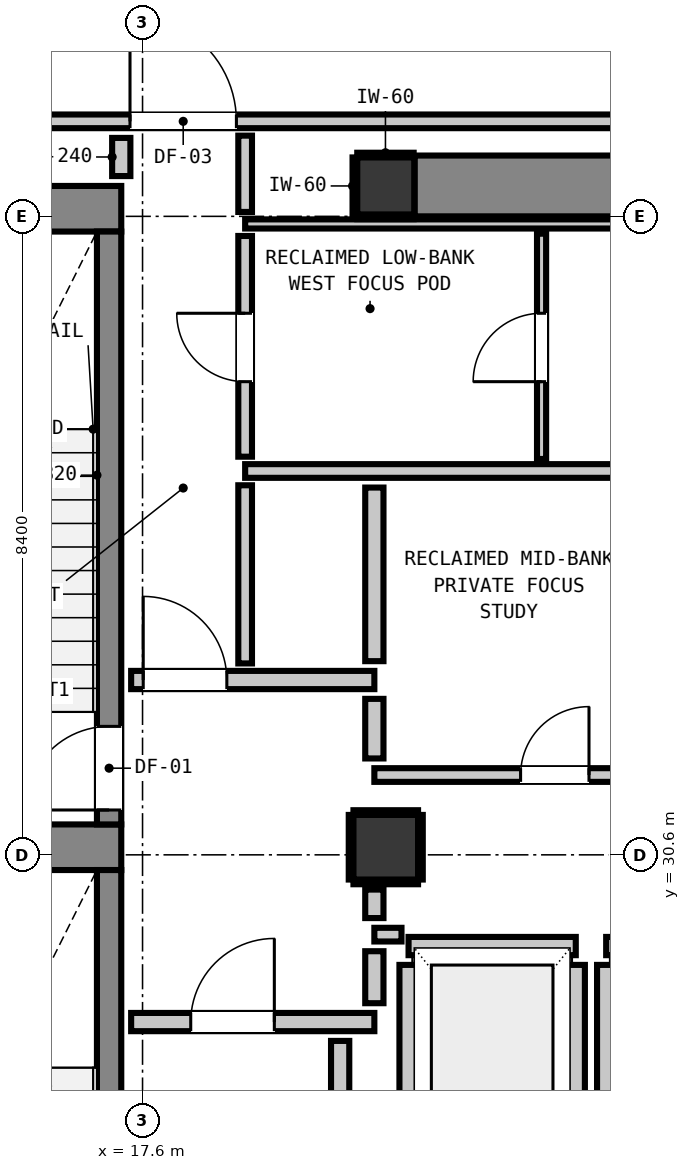
"""IFC4 building model, lengths in metres.
Left out: names, types, materials, properties, quantities, classifications, styles, units other than length and angle.
Written with IfcOpenShell. Run it as: python <this file> out.ifc"""

import sys

from ifc_helpers import new_model, si_unit, direction, frame, frame_2d, origin, origin_2d, place, context, subcontext, project, spatial, rectangle, extrude, element, fill, save


model = new_model("IFC4")
c1 = context("Model", 3, precision=1e-05, world=origin(), true_north=direction((0.0, 1.0)))
c2 = subcontext(c1, "Body", "Model", "MODEL_VIEW")
j1 = project(units=[si_unit("LENGTHUNIT", "METRE"), si_unit("PLANEANGLEUNIT", "RADIAN")], contexts=[c1])
p1 = place(None, origin())
s1 = spatial("IfcSite", under=j1, at=p1, CompositionType="ELEMENT")
p2 = place(p1, origin())
s2 = spatial("IfcBuilding", under=s1, at=p2, CompositionType="ELEMENT")
p3 = place(p2, frame((0.0, 0.0, 226.68)))
s3 = spatial("IfcBuildingStorey", under=s2, at=p3, CompositionType="ELEMENT", Elevation=226.68)
p4 = place(p3, frame((20.8, 39.4, 0.0), z_axis=(0.0, 0.0, 1.0), x_axis=(1.0, 0.0, 0.0)))
e1 = element("IfcColumn", 1, at=p4, inside=s3, PredefinedType="COLUMN", context=c2, shape_type="SweptSolid", body=[
    extrude(rectangle(XDim=0.75, YDim=0.75, at=origin_2d()), origin(), (0.0, 0.0, 1.0), 4.6),
])
p5 = place(p3, frame((13.24, 39.1, 0.0), z_axis=(0.0, 0.0, 1.0), x_axis=(1.0, 0.0, 0.0)))
e2 = element("IfcWall", 2, at=p5, inside=s3, PredefinedType="SHEAR", context=c2, shape_type="SweptSolid", body=[
    extrude(rectangle(XDim=4.08, YDim=0.6, at=frame_2d((2.04, 0.0))), origin(), (0.0, 0.0, 1.0), 4.6),
])
p6 = place(p3, frame((13.78, 30.7, 0.0), z_axis=(0.0, 0.0, 1.0), x_axis=(1.0, 0.0, 0.0)))
e3 = element("IfcWall", 3, at=p6, inside=s3, PredefinedType="SHEAR", context=c2, shape_type="SweptSolid", body=[
    extrude(rectangle(XDim=3.54, YDim=0.6, at=frame_2d((1.77, 0.0))), origin(), (0.0, 0.0, 1.0), 4.6),
])
p7 = place(p3, frame((21.18, 39.4, 0.0), z_axis=(0.0, 0.0, 1.0), x_axis=(1.0, 0.0, 0.0)))
e4 = element("IfcWall", 4, at=p7, inside=s3, PredefinedType="SHEAR", context=c2, shape_type="SweptSolid", body=[
    extrude(rectangle(XDim=7.64, YDim=0.8, at=frame_2d((3.82, 0.0))), origin(), (0.0, 0.0, 1.0), 4.6),
])
p8 = place(p3, frame((17.16, 31.0, 0.0), z_axis=(0.0, 0.0, 1.0), x_axis=(0.0, 1.0, 0.0)))
e5 = element("IfcWall", 5, at=p8, inside=s3, PredefinedType="SHEAR", context=c2, shape_type="SweptSolid", body=[
    extrude(rectangle(XDim=7.8, YDim=0.32, at=frame_2d((3.9, 0.0))), origin(), (0.0, 0.0, 1.0), 4.6),
])
p9 = place(p8, frame((0.19, 0.0, 0.0)))
e6 = element("IfcOpeningElement", 6, at=p9, cuts=e5, PredefinedType="OPENING", context=c2, shape_type="SweptSolid", body=[
    extrude(rectangle(XDim=1.1, YDim=2.15, at=frame_2d((0.55, 1.075))), frame((0.0, 0.17, 0.0), z_axis=(0.0, -1.0, 0.0), x_axis=(1.0, 0.0, 0.0)), (0.0, 0.0, 1.0), 0.34),
])
p10 = place(p3, frame((17.16, 22.4, 0.0), z_axis=(0.0, 0.0, 1.0), x_axis=(0.0, 1.0, 0.0)))
e7 = element("IfcWall", 7, at=p10, inside=s3, PredefinedType="SHEAR", context=c2, shape_type="SweptSolid", body=[
    extrude(rectangle(XDim=8.0, YDim=0.32, at=frame_2d((4.0, 0.0))), origin(), (0.0, 0.0, 1.0), 4.6),
])
p11 = place(p10, frame((0.39, 0.0, 0.0)))
e8 = element("IfcOpeningElement", 8, at=p11, cuts=e7, PredefinedType="OPENING", context=c2, shape_type="SweptSolid", body=[
    extrude(rectangle(XDim=1.1, YDim=2.15, at=frame_2d((0.55, 1.075))), frame((0.0, 0.17, 0.0), z_axis=(0.0, -1.0, 0.0), x_axis=(1.0, 0.0, 0.0)), (0.0, 0.0, 1.0), 0.34),
])
p12 = place(p3, frame((20.8, 30.7, 0.0), z_axis=(0.0, 0.0, 1.0), x_axis=(1.0, 0.0, 0.0)))
e9 = element("IfcColumn", 9, at=p12, inside=s3, PredefinedType="COLUMN", context=c2, shape_type="SweptSolid", body=[
    extrude(rectangle(XDim=0.85, YDim=0.85, at=origin_2d()), origin(), (0.0, 0.0, 1.0), 4.6),
])
p13 = place(p3, frame((21.1, 29.4, 0.0), z_axis=(0.0, 0.0, 1.0), x_axis=(1.0, 0.0, 0.0)))
e10 = element("IfcWall", 10, at=p13, inside=s3, PredefinedType="PARTITIONING", context=c2, shape_type="SweptSolid", body=[
    extrude(rectangle(XDim=2.2, YDim=0.24, at=frame_2d((1.1, 0.0))), origin(), (0.0, 0.0, 1.0), 4.18),
])
p14 = place(p3, frame((21.1, 27.048, 0.0), z_axis=(0.0, 0.0, 1.0), x_axis=(0.0, 1.0, 0.0)))
e11 = element("IfcWall", 11, at=p14, inside=s3, PredefinedType="PARTITIONING", context=c2, shape_type="SweptSolid", body=[
    extrude(rectangle(XDim=2.104, YDim=0.24, at=frame_2d((1.052, 0.0))), origin(), (0.0, 0.0, 1.0), 2.185),
])
p15 = place(p3, frame((23.3, 27.048, 0.0), z_axis=(0.0, 0.0, 1.0), x_axis=(0.0, 1.0, 0.0)))
e12 = element("IfcWall", 12, at=p15, inside=s3, PredefinedType="PARTITIONING", context=c2, shape_type="SweptSolid", body=[
    extrude(rectangle(XDim=2.104, YDim=0.24, at=frame_2d((1.052, 0.0))), origin(), (0.0, 0.0, 1.0), 4.18),
])
p16 = place(p3, frame((23.7, 29.4, 0.0), z_axis=(0.0, 0.0, 1.0), x_axis=(1.0, 0.0, 0.0)))
e13 = element("IfcWall", 13, at=p16, inside=s3, PredefinedType="PARTITIONING", context=c2, shape_type="SweptSolid", body=[
    extrude(rectangle(XDim=2.2, YDim=0.24, at=frame_2d((1.1, 0.0))), origin(), (0.0, 0.0, 1.0), 4.18),
])
p17 = place(p3, frame((23.7, 27.048, 0.0), z_axis=(0.0, 0.0, 1.0), x_axis=(0.0, 1.0, 0.0)))
e14 = element("IfcWall", 14, at=p17, inside=s3, PredefinedType="PARTITIONING", context=c2, shape_type="SweptSolid", body=[
    extrude(rectangle(XDim=2.104, YDim=0.24, at=frame_2d((1.052, 0.0))), origin(), (0.0, 0.0, 1.0), 4.18),
])
p18 = place(p3, frame((17.45, 28.4, 0.0), z_axis=(0.0, 0.0, 1.0), x_axis=(1.0, 0.0, 0.0)))
e15 = element("IfcWall", 15, at=p18, inside=s3, PredefinedType="PARTITIONING", context=c2, shape_type="SweptSolid", body=[
    extrude(rectangle(XDim=3.2, YDim=0.24, at=frame_2d((1.6, 0.0))), origin(), (0.0, 0.0, 1.0), 4.18),
])
p19 = place(p18, frame((0.784, 0.0, 0.0)))
e16 = element("IfcOpeningElement", 16, at=p19, cuts=e15, PredefinedType="OPENING", context=c2, shape_type="SweptSolid", body=[
    extrude(rectangle(XDim=1.1, YDim=2.15, at=frame_2d((0.55, 1.075))), frame((0.0, 0.13, 0.0), z_axis=(0.0, -1.0, 0.0), x_axis=(1.0, 0.0, 0.0)), (0.0, 0.0, 1.0), 0.26),
])
p20 = place(p3, frame((17.45, 32.9, 0.0), z_axis=(0.0, 0.0, 1.0), x_axis=(1.0, 0.0, 0.0)))
e17 = element("IfcWall", 17, at=p20, inside=s3, PredefinedType="PARTITIONING", context=c2, shape_type="SweptSolid", body=[
    extrude(rectangle(XDim=3.2, YDim=0.24, at=frame_2d((1.6, 0.0))), origin(), (0.0, 0.0, 1.0), 4.18),
])
p21 = place(p20, frame((0.159, 0.0, 0.0)))
e18 = element("IfcOpeningElement", 18, at=p21, cuts=e17, PredefinedType="OPENING", context=c2, shape_type="SweptSolid", body=[
    extrude(rectangle(XDim=1.1, YDim=2.15, at=frame_2d((0.55, 1.075))), frame((0.0, 0.13, 0.0), z_axis=(0.0, -1.0, 0.0), x_axis=(1.0, 0.0, 0.0)), (0.0, 0.0, 1.0), 0.26),
])
p22 = place(p3, frame((20.65, 29.55, 0.0), z_axis=(0.0, 0.0, 1.0), x_axis=(1.0, 0.0, 0.0)))
e19 = element("IfcWall", 19, at=p22, inside=s3, PredefinedType="PARTITIONING", context=c2, shape_type="SweptSolid", body=[
    extrude(rectangle(XDim=0.357, YDim=0.18, at=frame_2d((0.179, 0.0))), origin(), (0.0, 0.0, 1.0), 4.18),
])
p23 = place(p3, frame((20.65, 31.65, 0.0), z_axis=(0.0, 0.0, 1.0), x_axis=(1.0, 0.0, 0.0)))
e20 = element("IfcWall", 20, at=p23, inside=s3, PredefinedType="PARTITIONING", context=c2, shape_type="SweptSolid", body=[
    extrude(rectangle(XDim=7.7, YDim=0.18, at=frame_2d((3.85, 0.0))), origin(), (0.0, 0.0, 1.0), 4.18),
])
p24 = place(p23, frame((1.924, 0.0, 0.0)))
e21 = element("IfcOpeningElement", 21, at=p24, cuts=e20, PredefinedType="OPENING", context=c2, shape_type="SweptSolid", body=[
    extrude(rectangle(XDim=0.9, YDim=2.1, at=frame_2d((0.45, 1.05))), frame((0.0, 0.1, 0.0), z_axis=(0.0, -1.0, 0.0), x_axis=(1.0, 0.0, 0.0)), (0.0, 0.0, 1.0), 0.2),
])
p25 = place(p3, frame((18.95, 35.65, 0.0), z_axis=(0.0, 0.0, 1.0), x_axis=(1.0, 0.0, 0.0)))
e22 = element("IfcWall", 22, at=p25, inside=s3, PredefinedType="PARTITIONING", context=c2, shape_type="SweptSolid", body=[
    extrude(rectangle(XDim=11.025, YDim=0.18, at=frame_2d((5.513, 0.0))), origin(), (0.0, 0.0, 1.0), 4.18),
])
p26 = place(p3, frame((10.787, 40.25, 0.0), z_axis=(0.0, 0.0, 1.0), x_axis=(1.0, 0.0, 0.0)))
e23 = element("IfcWall", 23, at=p26, inside=s3, PredefinedType="PARTITIONING", context=c2, shape_type="SweptSolid", body=[
    extrude(rectangle(XDim=36.626, YDim=0.18, at=frame_2d((18.313, 0.0))), origin(), (0.0, 0.0, 1.0), 4.18),
])
p27 = place(p26, frame((6.648, 0.0, 0.0)))
e24 = element("IfcOpeningElement", 24, at=p27, cuts=e23, PredefinedType="OPENING", context=c2, shape_type="SweptSolid", body=[
    extrude(rectangle(XDim=1.4, YDim=2.15, at=frame_2d((0.7, 1.075))), frame((0.0, 0.1, 0.0), z_axis=(0.0, -1.0, 0.0), x_axis=(1.0, 0.0, 0.0)), (0.0, 0.0, 1.0), 0.2),
])
p28 = place(p26, frame((1.012, 0.0, 0.0)))
e25 = element("IfcOpeningElement", 25, at=p28, cuts=e23, PredefinedType="OPENING", context=c2, shape_type="SweptSolid", body=[
    extrude(rectangle(XDim=1.0, YDim=2.15, at=frame_2d((0.5, 1.075))), frame((0.0, 0.1, 0.0), z_axis=(0.0, -1.0, 0.0), x_axis=(1.0, 0.0, 0.0)), (0.0, 0.0, 1.0), 0.2),
])
p29 = place(p26, frame((27.263, 0.0, 0.0)))
e26 = element("IfcOpeningElement", 26, at=p29, cuts=e23, PredefinedType="OPENING", context=c2, shape_type="SweptSolid", body=[
    extrude(rectangle(XDim=1.4, YDim=2.15, at=frame_2d((0.7, 1.075))), frame((0.0, 0.1, 0.0), z_axis=(0.0, -1.0, 0.0), x_axis=(1.0, 0.0, 0.0)), (0.0, 0.0, 1.0), 0.2),
])
p30 = place(p26, frame((32.289, 0.0, 0.0)))
e27 = element("IfcOpeningElement", 27, at=p30, cuts=e23, PredefinedType="OPENING", context=c2, shape_type="SweptSolid", body=[
    extrude(rectangle(XDim=0.95, YDim=2.1, at=frame_2d((0.475, 1.05))), frame((0.0, 0.1, 0.0), z_axis=(0.0, -1.0, 0.0), x_axis=(1.0, 0.0, 0.0)), (0.0, 0.0, 1.0), 0.2),
])
p31 = place(p3, frame((18.95, 38.9, 0.0), z_axis=(0.0, 0.0, 1.0), x_axis=(1.0, 0.0, 0.0)))
e28 = element("IfcWall", 28, at=p31, inside=s3, PredefinedType="PARTITIONING", context=c2, shape_type="SweptSolid", body=[
    extrude(rectangle(XDim=11.025, YDim=0.12, at=frame_2d((5.513, 0.0))), origin(), (0.0, 0.0, 1.0), 2.185),
])
p32 = place(p3, frame((17.32, 39.53, 0.0), z_axis=(0.0, 0.0, 1.0), x_axis=(0.0, 1.0, 0.0)))
e29 = element("IfcWall", 29, at=p32, inside=s3, PredefinedType="PARTITIONING", context=c2, shape_type="SweptSolid", body=[
    extrude(rectangle(XDim=0.502, YDim=0.24, at=frame_2d((0.251, 0.0))), origin(), (0.0, 0.0, 1.0), 4.18),
])
p33 = place(p3, frame((20.2, 21.398, 0.0), z_axis=(0.0, 0.0, 1.0), x_axis=(0.0, 1.0, 0.0)))
e30 = element("IfcWall", 30, at=p33, inside=s3, PredefinedType="PARTITIONING", context=c2, shape_type="SweptSolid", body=[
    extrude(rectangle(XDim=6.754, YDim=0.24, at=frame_2d((3.377, 0.0))), origin(), (0.0, 0.0, 1.0), 2.185),
])
p34 = place(p3, frame((20.65, 28.648, 0.0), z_axis=(0.0, 0.0, 1.0), x_axis=(0.0, 1.0, 0.0)))
e31 = element("IfcWall", 31, at=p34, inside=s3, PredefinedType="PARTITIONING", context=c2, shape_type="SweptSolid", body=[
    extrude(rectangle(XDim=0.684, YDim=0.24, at=frame_2d((0.342, 0.0))), origin(), (0.0, 0.0, 1.0), 2.185),
])
p35 = place(p3, frame((20.65, 29.768, 0.0), z_axis=(0.0, 0.0, 1.0), x_axis=(0.0, 1.0, 0.0)))
e32 = element("IfcWall", 32, at=p35, inside=s3, PredefinedType="PARTITIONING", context=c2, shape_type="SweptSolid", body=[
    extrude(rectangle(XDim=0.375, YDim=0.24, at=frame_2d((0.188, 0.0))), origin(), (0.0, 0.0, 1.0), 2.185),
])
p36 = place(p3, frame((20.65, 31.868, 0.0), z_axis=(0.0, 0.0, 1.0), x_axis=(0.0, 1.0, 0.0)))
e33 = element("IfcWall", 33, at=p36, inside=s3, PredefinedType="PARTITIONING", context=c2, shape_type="SweptSolid", body=[
    extrude(rectangle(XDim=0.784, YDim=0.24, at=frame_2d((0.392, 0.0))), origin(), (0.0, 0.0, 1.0), 2.185),
])
p37 = place(p3, frame((20.65, 33.148, 0.0), z_axis=(0.0, 0.0, 1.0), x_axis=(0.0, 1.0, 0.0)))
e34 = element("IfcWall", 34, at=p37, inside=s3, PredefinedType="PARTITIONING", context=c2, shape_type="SweptSolid", body=[
    extrude(rectangle(XDim=2.284, YDim=0.24, at=frame_2d((1.142, 0.0))), origin(), (0.0, 0.0, 1.0), 2.185),
])
p38 = place(p3, frame((18.95, 33.118, 0.0), z_axis=(0.0, 0.0, 1.0), x_axis=(0.0, 1.0, 0.0)))
e35 = element("IfcWall", 35, at=p38, inside=s3, PredefinedType="PARTITIONING", context=c2, shape_type="SweptSolid", body=[
    extrude(rectangle(XDim=2.344, YDim=0.18, at=frame_2d((1.172, 0.0))), origin(), (0.0, 0.0, 1.0), 4.18),
])
p39 = place(p3, frame((18.95, 35.838, 0.0), z_axis=(0.0, 0.0, 1.0), x_axis=(0.0, 1.0, 0.0)))
e36 = element("IfcWall", 36, at=p39, inside=s3, PredefinedType="PARTITIONING", context=c2, shape_type="SweptSolid", body=[
    extrude(rectangle(XDim=2.904, YDim=0.18, at=frame_2d((1.452, 0.0))), origin(), (0.0, 0.0, 1.0), 4.18),
])
p40 = place(p39, frame((0.987, 0.0, 0.0)))
e37 = element("IfcOpeningElement", 37, at=p40, cuts=e36, PredefinedType="OPENING", context=c2, shape_type="SweptSolid", body=[
    extrude(rectangle(XDim=0.9, YDim=2.1, at=frame_2d((0.45, 1.05))), frame((0.0, 0.1, 0.0), z_axis=(0.0, -1.0, 0.0), x_axis=(1.0, 0.0, 0.0)), (0.0, 0.0, 1.0), 0.2),
])
p41 = place(p3, frame((18.95, 39.058, 0.0), z_axis=(0.0, 0.0, 1.0), x_axis=(0.0, 1.0, 0.0)))
e38 = element("IfcWall", 38, at=p41, inside=s3, PredefinedType="PARTITIONING", context=c2, shape_type="SweptSolid", body=[
    extrude(rectangle(XDim=1.004, YDim=0.18, at=frame_2d((0.502, 0.0))), origin(), (0.0, 0.0, 1.0), 4.18),
])
p42 = place(p3, frame((22.85, 35.808, 0.0), z_axis=(0.0, 0.0, 1.0), x_axis=(0.0, 1.0, 0.0)))
e39 = element("IfcWall", 39, at=p42, inside=s3, PredefinedType="PARTITIONING", context=c2, shape_type="SweptSolid", body=[
    extrude(rectangle(XDim=2.964, YDim=0.12, at=frame_2d((1.482, 0.0))), origin(), (0.0, 0.0, 1.0), 4.18),
])
p43 = place(p42, frame((1.017, 0.0, 0.0)))
e40 = element("IfcOpeningElement", 40, at=p43, cuts=e39, PredefinedType="OPENING", context=c2, shape_type="SweptSolid", body=[
    extrude(rectangle(XDim=0.9, YDim=2.1, at=frame_2d((0.45, 1.05))), frame((0.0, 0.07, 0.0), z_axis=(0.0, -1.0, 0.0), x_axis=(1.0, 0.0, 0.0)), (0.0, 0.0, 1.0), 0.14),
])
for number, where, z_axis, x_axis in (
    (41, (20.425, 38.993, 0.0), (0.0, 0.0, 1.0), (1.0, 0.0, 0.0)),
    (42, (20.425, 39.807, 0.0), (0.0, 0.0, 1.0), (1.0, 0.0, 0.0)),
):
    element("IfcWall", number, at=place(p3, frame(where, z_axis=z_axis, x_axis=x_axis)), inside=s3, PredefinedType="PARTITIONING", context=c2, shape_type="SweptSolid", body=[
        extrude(rectangle(XDim=0.742, YDim=0.06, at=frame_2d((0.371, 0.0))), origin(), (0.0, 0.0, 1.0), 1.45),
    ])
p44 = place(p3, frame((20.393, 39.025, 0.0), z_axis=(0.0, 0.0, 1.0), x_axis=(0.0, 1.0, 0.0)))
e43 = element("IfcWall", 43, at=p44, inside=s3, PredefinedType="PARTITIONING", context=c2, shape_type="SweptSolid", body=[
    extrude(rectangle(XDim=0.75, YDim=0.06, at=frame_2d((0.375, 0.0))), origin(), (0.0, 0.0, 1.0), 1.45),
])
for number, where, z_axis, x_axis in (
    (44, (20.375, 30.243, 0.0), (0.0, 0.0, 1.0), (1.0, 0.0, 0.0)),
    (45, (20.375, 31.157, 0.0), (0.0, 0.0, 1.0), (1.0, 0.0, 0.0)),
    (46, (20.343, 30.275, 0.0), (0.0, 0.0, 1.0), (0.0, 1.0, 0.0)),
    (47, (21.257, 30.275, 0.0), (0.0, 0.0, 1.0), (0.0, 1.0, 0.0)),
):
    element("IfcWall", number, at=place(p3, frame(where, z_axis=z_axis, x_axis=x_axis)), inside=s3, PredefinedType="PARTITIONING", context=c2, shape_type="SweptSolid", body=[
        extrude(rectangle(XDim=0.85, YDim=0.06, at=frame_2d((0.425, 0.0))), origin(), (0.0, 0.0, 1.0), 1.45),
    ])
p45 = place(p9, origin())
e48 = element("IfcDoor", 48, at=p45, inside=s3, OperationType="SINGLE_SWING_LEFT", PredefinedType="DOOR", context=c2, shape_type="SweptSolid", body=[
    extrude(rectangle(XDim=1.1, YDim=2.15, at=frame_2d((0.55, 1.075))), frame((0.0, 0.025, 0.0), z_axis=(0.0, -1.0, 0.0), x_axis=(1.0, 0.0, 0.0)), (0.0, 0.0, 1.0), 0.05),
])
fill(e6, e48)
p46 = place(p19, origin())
e49 = element("IfcDoor", 49, at=p46, inside=s3, OperationType="SINGLE_SWING_RIGHT", PredefinedType="DOOR", context=c2, shape_type="SweptSolid", body=[
    extrude(rectangle(XDim=1.1, YDim=2.15, at=frame_2d((0.55, 1.075))), frame((0.0, 0.025, 0.0), z_axis=(0.0, -1.0, 0.0), x_axis=(1.0, 0.0, 0.0)), (0.0, 0.0, 1.0), 0.05),
])
fill(e16, e49)
p47 = place(p21, origin())
e50 = element("IfcDoor", 50, at=p47, inside=s3, OperationType="SINGLE_SWING_LEFT", PredefinedType="DOOR", context=c2, shape_type="SweptSolid", body=[
    extrude(rectangle(XDim=1.1, YDim=2.15, at=frame_2d((0.55, 1.075))), frame((0.0, 0.025, 0.0), z_axis=(0.0, -1.0, 0.0), x_axis=(1.0, 0.0, 0.0)), (0.0, 0.0, 1.0), 0.05),
])
fill(e18, e50)
p48 = place(p27, origin())
e51 = element("IfcDoor", 51, at=p48, inside=s3, OperationType="SINGLE_SWING_LEFT", PredefinedType="DOOR", context=c2, shape_type="SweptSolid", body=[
    extrude(rectangle(XDim=1.4, YDim=2.15, at=frame_2d((0.7, 1.075))), frame((0.0, 0.025, 0.0), z_axis=(0.0, -1.0, 0.0), x_axis=(1.0, 0.0, 0.0)), (0.0, 0.0, 1.0), 0.05),
])
fill(e24, e51)
p49 = place(p40, origin())
e52 = element("IfcDoor", 52, at=p49, inside=s3, OperationType="SINGLE_SWING_RIGHT", PredefinedType="DOOR", context=c2, shape_type="SweptSolid", body=[
    extrude(rectangle(XDim=0.9, YDim=2.1, at=frame_2d((0.45, 1.05))), frame((0.0, 0.025, 0.0), z_axis=(0.0, -1.0, 0.0), x_axis=(1.0, 0.0, 0.0)), (0.0, 0.0, 1.0), 0.05),
])
fill(e37, e52)
p50 = place(p43, origin())
e53 = element("IfcDoor", 53, at=p50, inside=s3, OperationType="SINGLE_SWING_LEFT", PredefinedType="DOOR", context=c2, shape_type="SweptSolid", body=[
    extrude(rectangle(XDim=0.9, YDim=2.1, at=frame_2d((0.45, 1.05))), frame((0.0, 0.025, 0.0), z_axis=(0.0, -1.0, 0.0), x_axis=(1.0, 0.0, 0.0)), (0.0, 0.0, 1.0), 0.05),
])
fill(e40, e53)
p51 = place(p24, origin())
e54 = element("IfcDoor", 54, at=p51, inside=s3, OperationType="SINGLE_SWING_RIGHT", PredefinedType="DOOR", context=c2, shape_type="SweptSolid", body=[
    extrude(rectangle(XDim=0.9, YDim=2.1, at=frame_2d((0.45, 1.05))), frame((0.0, 0.025, 0.0), z_axis=(0.0, -1.0, 0.0), x_axis=(1.0, 0.0, 0.0)), (0.0, 0.0, 1.0), 0.05),
])
fill(e21, e54)
save(model, sys.argv[1])
